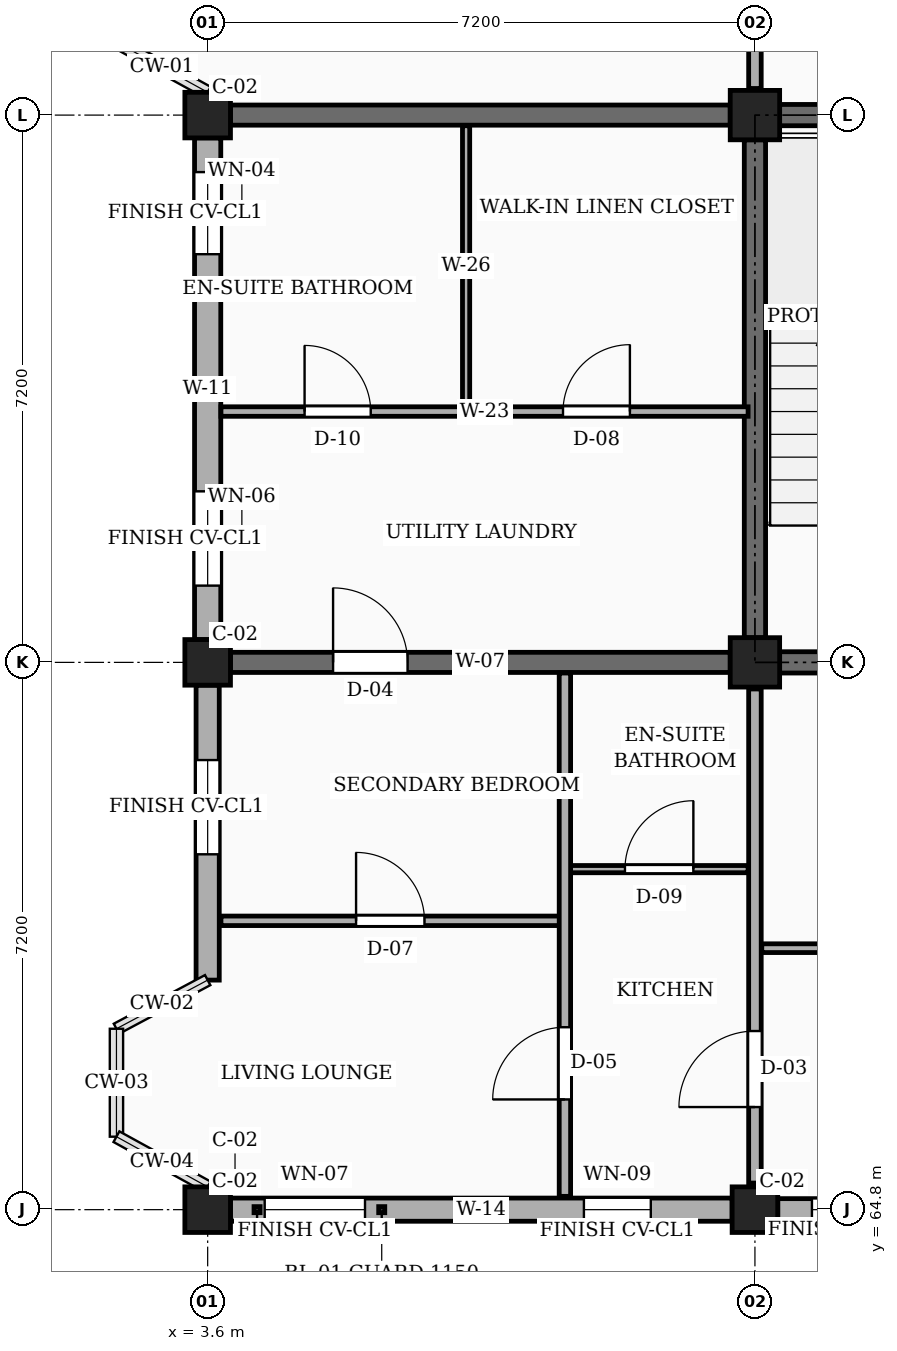
"""IFC4 building model, lengths in metres.
Left out: names, types, materials, properties, quantities, classifications, styles, units other than length and angle.
Written with IfcOpenShell. Run it as: python <this file> out.ifc"""

import sys

from ifc_helpers import new_model, si_unit, direction, frame, frame_2d, origin, origin_2d, place, context, subcontext, project, spatial, rectangle, extrude, element, fill, save


model = new_model("IFC4")
c1 = context("Model", 3, precision=1e-05, world=origin(), true_north=direction((0.0, 1.0)))
c2 = subcontext(c1, "Body", "Model", "MODEL_VIEW")
j1 = project(units=[si_unit("LENGTHUNIT", "METRE"), si_unit("PLANEANGLEUNIT", "RADIAN")], contexts=[c1])
p1 = place(None, origin())
s1 = spatial("IfcSite", under=j1, at=p1, CompositionType="ELEMENT")
p2 = place(p1, origin())
s2 = spatial("IfcBuilding", under=s1, at=p2, CompositionType="ELEMENT")
p3 = place(p2, frame((0.0, 0.0, 7.65)))
s3 = spatial("IfcBuildingStorey", under=s2, at=p3, CompositionType="ELEMENT", Elevation=7.65)
for number, where, z_axis, x_axis in (
    (1, (3.6, 64.8, 0.0), (0.0, 0.0, 1.0), (1.0, 0.0, 0.0)),
    (2, (3.6, 72.0, 0.0), (0.0, 0.0, 1.0), (1.0, 0.0, 0.0)),
    (3, (3.6, 79.2, 0.0), (0.0, 0.0, 1.0), (1.0, 0.0, 0.0)),
    (4, (10.8, 64.8, 0.0), (0.0, 0.0, 1.0), (1.0, 0.0, 0.0)),
):
    element("IfcColumn", number, at=place(p3, frame(where, z_axis=z_axis, x_axis=x_axis)), inside=s3, PredefinedType="COLUMN", context=c2, shape_type="SweptSolid", body=[
        extrude(rectangle(XDim=0.6, YDim=0.6, at=origin_2d()), origin(), (0.0, 0.0, 1.0), 3.15),
    ])
for number, where, z_axis, x_axis in (
    (5, (10.8, 72.0, 0.0), (0.0, 0.0, 1.0), (1.0, 0.0, 0.0)),
    (6, (10.8, 79.2, 0.0), (0.0, 0.0, 1.0), (1.0, 0.0, 0.0)),
):
    element("IfcColumn", number, at=place(p3, frame(where, z_axis=z_axis, x_axis=x_axis)), inside=s3, PredefinedType="COLUMN", context=c2, shape_type="SweptSolid", body=[
        extrude(rectangle(XDim=0.65, YDim=0.65, at=origin_2d()), origin(), (0.0, 0.0, 1.0), 3.15),
    ])
p4 = place(p3, frame((3.9, 72.0, 0.0), z_axis=(0.0, 0.0, 1.0), x_axis=(1.0, 0.0, 0.0)))
e7 = element("IfcWall", 7, at=p4, inside=s3, PredefinedType="SOLIDWALL", context=c2, shape_type="SweptSolid", body=[
    extrude(rectangle(XDim=6.575, YDim=0.265, at=frame_2d((3.288, 0.0))), origin(), (0.0, 0.0, 1.0), 2.21),
])
p5 = place(p4, frame((1.35, 0.0, 0.0)))
e8 = element("IfcOpeningElement", 8, at=p5, cuts=e7, PredefinedType="OPENING", context=c2, shape_type="SweptSolid", body=[
    extrude(rectangle(XDim=0.98, YDim=2.12, at=frame_2d((0.49, 1.06))), frame((0.0, 0.143, 0.0), z_axis=(0.0, -1.0, 0.0), x_axis=(1.0, 0.0, 0.0)), (0.0, 0.0, 1.0), 0.285),
])
p6 = place(p3, frame((3.9, 79.2, 0.0), z_axis=(0.0, 0.0, 1.0), x_axis=(1.0, 0.0, 0.0)))
e9 = element("IfcWall", 9, at=p6, inside=s3, PredefinedType="SOLIDWALL", context=c2, shape_type="SweptSolid", body=[
    extrude(rectangle(XDim=6.575, YDim=0.265, at=frame_2d((3.288, 0.0))), origin(), (0.0, 0.0, 1.0), 2.21),
])
p7 = place(p3, frame((3.9, 64.8, 0.0), z_axis=(0.0, 0.0, 1.0), x_axis=(1.0, 0.0, 0.0)))
e10 = element("IfcWall", 10, at=p7, inside=s3, PredefinedType="SOLIDWALL", context=c2, shape_type="SweptSolid", body=[
    extrude(rectangle(XDim=6.6, YDim=0.305, at=frame_2d((3.3, 0.0))), origin(), (0.0, 0.0, 1.0), 2.48),
])
p8 = place(p7, frame((0.45, 0.0, 0.78)))
e11 = element("IfcOpeningElement", 11, at=p8, cuts=e10, PredefinedType="OPENING", context=c2, shape_type="SweptSolid", body=[
    extrude(rectangle(XDim=1.32, YDim=1.15, at=frame_2d((0.66, 0.575))), frame((0.0, 0.163, 0.0), z_axis=(0.0, -1.0, 0.0), x_axis=(1.0, 0.0, 0.0)), (0.0, 0.0, 1.0), 0.325),
])
p9 = place(p7, frame((4.65, 0.0, 0.78)))
e12 = element("IfcOpeningElement", 12, at=p9, cuts=e10, PredefinedType="OPENING", context=c2, shape_type="SweptSolid", body=[
    extrude(rectangle(XDim=0.88, YDim=1.26, at=frame_2d((0.44, 0.63))), frame((0.0, 0.163, 0.0), z_axis=(0.0, -1.0, 0.0), x_axis=(1.0, 0.0, 0.0)), (0.0, 0.0, 1.0), 0.325),
])
p10 = place(p3, frame((11.1, 64.8, 0.0), z_axis=(0.0, 0.0, 1.0), x_axis=(1.0, 0.0, 0.0)))
e13 = element("IfcWall", 13, at=p10, inside=s3, PredefinedType="SOLIDWALL", context=c2, shape_type="SweptSolid", body=[
    extrude(rectangle(XDim=6.6, YDim=0.29, at=frame_2d((3.3, 0.0))), origin(), (0.0, 0.0, 1.0), 2.48),
])
p11 = place(p10, frame((0.45, 0.0, 0.78)))
e14 = element("IfcOpeningElement", 14, at=p11, cuts=e13, PredefinedType="OPENING", context=c2, shape_type="SweptSolid", body=[
    extrude(rectangle(XDim=0.88, YDim=1.26, at=frame_2d((0.44, 0.63))), frame((0.0, 0.155, 0.0), z_axis=(0.0, -1.0, 0.0), x_axis=(1.0, 0.0, 0.0)), (0.0, 0.0, 1.0), 0.31),
])
p12 = place(p10, frame((4.65, 0.0, 0.78)))
e15 = element("IfcOpeningElement", 15, at=p12, cuts=e13, PredefinedType="OPENING", context=c2, shape_type="SweptSolid", body=[
    extrude(rectangle(XDim=1.04, YDim=1.26, at=frame_2d((0.52, 0.63))), frame((0.0, 0.155, 0.0), z_axis=(0.0, -1.0, 0.0), x_axis=(1.0, 0.0, 0.0)), (0.0, 0.0, 1.0), 0.31),
])
p13 = place(p3, frame((3.6, 78.9, 0.0), z_axis=(0.0, 0.0, 1.0), x_axis=(0.0, -1.0, 0.0)))
e16 = element("IfcWall", 16, at=p13, inside=s3, PredefinedType="SOLIDWALL", context=c2, shape_type="SweptSolid", body=[
    extrude(rectangle(XDim=6.6, YDim=0.345, at=frame_2d((3.3, 0.0))), origin(), (0.0, 0.0, 1.0), 2.48),
])
p14 = place(p13, frame((0.45, 0.0, 0.78)))
e17 = element("IfcOpeningElement", 17, at=p14, cuts=e16, PredefinedType="OPENING", context=c2, shape_type="SweptSolid", body=[
    extrude(rectangle(XDim=1.08, YDim=1.15, at=frame_2d((0.54, 0.575))), frame((0.0, 0.183, 0.0), z_axis=(0.0, -1.0, 0.0), x_axis=(1.0, 0.0, 0.0)), (0.0, 0.0, 1.0), 0.365),
])
p15 = place(p13, frame((4.65, 0.0, 0.78)))
e18 = element("IfcOpeningElement", 18, at=p15, cuts=e16, PredefinedType="OPENING", context=c2, shape_type="SweptSolid", body=[
    extrude(rectangle(XDim=1.24, YDim=1.15, at=frame_2d((0.62, 0.575))), frame((0.0, 0.183, 0.0), z_axis=(0.0, -1.0, 0.0), x_axis=(1.0, 0.0, 0.0)), (0.0, 0.0, 1.0), 0.365),
])
p16 = place(p3, frame((3.6, 71.7, 0.0), z_axis=(0.0, 0.0, 1.0), x_axis=(0.0, -1.0, 0.0)))
e19 = element("IfcWall", 19, at=p16, inside=s3, PredefinedType="SOLIDWALL", context=c2, shape_type="SweptSolid", body=[
    extrude(rectangle(XDim=3.88, YDim=0.305, at=frame_2d((1.94, 0.0))), origin(), (0.0, 0.0, 1.0), 2.48),
])
p17 = place(p16, frame((0.985, 0.0, 0.78)))
e20 = element("IfcOpeningElement", 20, at=p17, cuts=e19, PredefinedType="OPENING", context=c2, shape_type="SweptSolid", body=[
    extrude(rectangle(XDim=1.24, YDim=1.15, at=frame_2d((0.62, 0.575))), frame((0.0, 0.163, 0.0), z_axis=(0.0, -1.0, 0.0), x_axis=(1.0, 0.0, 0.0)), (0.0, 0.0, 1.0), 0.325),
])
for number, where, z_axis, x_axis in (
    (21, (10.8, 72.325, 0.0), (0.0, 0.0, 1.0), (0.0, 1.0, 0.0)),
    (22, (11.125, 79.2, 0.0), (0.0, 0.0, 1.0), (1.0, 0.0, 0.0)),
    (23, (11.125, 72.0, 0.0), (0.0, 0.0, 1.0), (1.0, 0.0, 0.0)),
):
    element("IfcWall", number, at=place(p3, frame(where, z_axis=z_axis, x_axis=x_axis)), inside=s3, PredefinedType="SHEAR", context=c2, shape_type="SweptSolid", body=[
        extrude(rectangle(XDim=6.55, YDim=0.28, at=frame_2d((3.275, 0.0))), origin(), (0.0, 0.0, 1.0), 2.91),
    ])
p18 = place(p3, frame((10.8, 65.15, 0.0), z_axis=(0.0, 0.0, 1.0), x_axis=(0.0, 1.0, 0.0)))
e24 = element("IfcWall", 24, at=p18, inside=s3, PredefinedType="PARTITIONING", context=c2, shape_type="SweptSolid", body=[
    extrude(rectangle(XDim=6.5, YDim=0.165, at=frame_2d((3.25, 0.0))), origin(), (0.0, 0.0, 1.0), 2.26),
])
p19 = place(p18, frame((1.0, 0.0, 0.0)))
e25 = element("IfcOpeningElement", 25, at=p19, cuts=e24, PredefinedType="OPENING", context=c2, shape_type="SweptSolid", body=[
    extrude(rectangle(XDim=1.0, YDim=2.15, at=frame_2d((0.5, 1.075))), frame((0.0, 0.093, 0.0), z_axis=(0.0, -1.0, 0.0), x_axis=(1.0, 0.0, 0.0)), (0.0, 0.0, 1.0), 0.185),
])
p20 = place(p3, frame((10.8, 79.55, 0.0), z_axis=(0.0, 0.0, 1.0), x_axis=(0.0, 1.0, 0.0)))
e26 = element("IfcWall", 26, at=p20, inside=s3, PredefinedType="PARTITIONING", context=c2, shape_type="SweptSolid", body=[
    extrude(rectangle(XDim=6.5, YDim=0.165, at=frame_2d((3.25, 0.0))), origin(), (0.0, 0.0, 1.0), 2.26),
])
p21 = place(p20, frame((1.1, 0.0, 0.0)))
e27 = element("IfcOpeningElement", 27, at=p21, cuts=e26, PredefinedType="OPENING", context=c2, shape_type="SweptSolid", body=[
    extrude(rectangle(XDim=0.94, YDim=2.12, at=frame_2d((0.47, 1.06))), frame((0.0, 0.093, 0.0), z_axis=(0.0, -1.0, 0.0), x_axis=(1.0, 0.0, 0.0)), (0.0, 0.0, 1.0), 0.185),
])
p22 = place(p3, frame((10.89, 68.24, 0.0), z_axis=(0.0, 0.0, 1.0), x_axis=(1.0, 0.0, 0.0)))
e28 = element("IfcWall", 28, at=p22, inside=s3, PredefinedType="PARTITIONING", context=c2, shape_type="SweptSolid", body=[
    extrude(rectangle(XDim=7.02, YDim=0.115, at=frame_2d((3.51, 0.0))), origin(), (0.0, 0.0, 1.0), 2.345),
])
p23 = place(p22, frame((2.85, 0.0, 0.0)))
e29 = element("IfcOpeningElement", 29, at=p23, cuts=e28, PredefinedType="OPENING", context=c2, shape_type="SweptSolid", body=[
    extrude(rectangle(XDim=1.02, YDim=2.15, at=frame_2d((0.51, 1.075))), frame((0.0, 0.067, 0.0), z_axis=(0.0, -1.0, 0.0), x_axis=(1.0, 0.0, 0.0)), (0.0, 0.0, 1.0), 0.135),
])
p24 = place(p3, frame((3.775, 68.6, 0.0), z_axis=(0.0, 0.0, 1.0), x_axis=(1.0, 0.0, 0.0)))
e30 = element("IfcWall", 30, at=p24, inside=s3, PredefinedType="PARTITIONING", context=c2, shape_type="SweptSolid", body=[
    extrude(rectangle(XDim=4.455, YDim=0.125, at=frame_2d((2.228, 0.0))), origin(), (0.0, 0.0, 1.0), 2.345),
])
p25 = place(p24, frame((1.778, 0.0, 0.0)))
e31 = element("IfcOpeningElement", 31, at=p25, cuts=e30, PredefinedType="OPENING", context=c2, shape_type="SweptSolid", body=[
    extrude(rectangle(XDim=0.9, YDim=2.1, at=frame_2d((0.45, 1.05))), frame((0.0, 0.073, 0.0), z_axis=(0.0, -1.0, 0.0), x_axis=(1.0, 0.0, 0.0)), (0.0, 0.0, 1.0), 0.145),
])
p26 = place(p3, frame((8.37, 69.28, 0.0), z_axis=(0.0, 0.0, 1.0), x_axis=(1.0, 0.0, 0.0)))
e32 = element("IfcWall", 32, at=p26, inside=s3, PredefinedType="PARTITIONING", context=c2, shape_type="SweptSolid", body=[
    extrude(rectangle(XDim=2.34, YDim=0.095, at=frame_2d((1.17, 0.0))), origin(), (0.0, 0.0, 1.0), 2.345),
])
p27 = place(p26, frame((0.72, 0.0, 0.0)))
e33 = element("IfcOpeningElement", 33, at=p27, cuts=e32, PredefinedType="OPENING", context=c2, shape_type="SweptSolid", body=[
    extrude(rectangle(XDim=0.9, YDim=2.05, at=frame_2d((0.45, 1.025))), frame((0.0, 0.058, 0.0), z_axis=(0.0, -1.0, 0.0), x_axis=(1.0, 0.0, 0.0)), (0.0, 0.0, 1.0), 0.115),
])
p28 = place(p3, frame((8.3, 64.975, 0.0), z_axis=(0.0, 0.0, 1.0), x_axis=(0.0, 1.0, 0.0)))
e34 = element("IfcWall", 34, at=p28, inside=s3, PredefinedType="PARTITIONING", context=c2, shape_type="SweptSolid", body=[
    extrude(rectangle(XDim=6.885, YDim=0.15, at=frame_2d((3.442, 0.0))), origin(), (0.0, 0.0, 1.0), 2.345),
])
p29 = place(p28, frame((1.275, 0.0, 0.0)))
e35 = element("IfcOpeningElement", 35, at=p29, cuts=e34, PredefinedType="OPENING", context=c2, shape_type="SweptSolid", body=[
    extrude(rectangle(XDim=0.95, YDim=2.1, at=frame_2d((0.475, 1.05))), frame((0.0, 0.085, 0.0), z_axis=(0.0, -1.0, 0.0), x_axis=(1.0, 0.0, 0.0)), (0.0, 0.0, 1.0), 0.17),
])
p30 = place(p3, frame((3.775, 75.3, 0.0), z_axis=(0.0, 0.0, 1.0), x_axis=(1.0, 0.0, 0.0)))
e36 = element("IfcWall", 36, at=p30, inside=s3, PredefinedType="PARTITIONING", context=c2, shape_type="SweptSolid", body=[
    extrude(rectangle(XDim=6.935, YDim=0.125, at=frame_2d((3.468, 0.0))), origin(), (0.0, 0.0, 1.0), 2.345),
])
p31 = place(p30, frame((1.1, 0.0, 0.0)))
e37 = element("IfcOpeningElement", 37, at=p31, cuts=e36, PredefinedType="OPENING", context=c2, shape_type="SweptSolid", body=[
    extrude(rectangle(XDim=0.87, YDim=2.05, at=frame_2d((0.435, 1.025))), frame((0.0, 0.073, 0.0), z_axis=(0.0, -1.0, 0.0), x_axis=(1.0, 0.0, 0.0)), (0.0, 0.0, 1.0), 0.145),
])
p32 = place(p30, frame((4.5, 0.0, 0.0)))
e38 = element("IfcOpeningElement", 38, at=p32, cuts=e36, PredefinedType="OPENING", context=c2, shape_type="SweptSolid", body=[
    extrude(rectangle(XDim=0.88, YDim=2.08, at=frame_2d((0.44, 1.04))), frame((0.0, 0.073, 0.0), z_axis=(0.0, -1.0, 0.0), x_axis=(1.0, 0.0, 0.0)), (0.0, 0.0, 1.0), 0.145),
])
p33 = place(p3, frame((7.0, 75.37, 0.0), z_axis=(0.0, 0.0, 1.0), x_axis=(0.0, 1.0, 0.0)))
e39 = element("IfcWall", 39, at=p33, inside=s3, PredefinedType="PARTITIONING", context=c2, shape_type="SweptSolid", body=[
    extrude(rectangle(XDim=3.69, YDim=0.095, at=frame_2d((1.845, 0.0))), origin(), (0.0, 0.0, 1.0), 2.345),
])
p34 = place(p8, origin())
e40 = element("IfcWindow", 40, at=p34, inside=s3, PartitioningType="SINGLE_PANEL", PredefinedType="WINDOW", context=c2, shape_type="SweptSolid", body=[
    extrude(rectangle(XDim=1.32, YDim=1.15, at=frame_2d((0.66, 0.575))), frame((0.0, 0.03, 0.0), z_axis=(0.0, -1.0, 0.0), x_axis=(1.0, 0.0, 0.0)), (0.0, 0.0, 1.0), 0.06),
])
fill(e11, e40)
p35 = place(p9, origin())
e41 = element("IfcWindow", 41, at=p35, inside=s3, PartitioningType="SINGLE_PANEL", PredefinedType="WINDOW", context=c2, shape_type="SweptSolid", body=[
    extrude(rectangle(XDim=0.88, YDim=1.26, at=frame_2d((0.44, 0.63))), frame((0.0, 0.03, 0.0), z_axis=(0.0, -1.0, 0.0), x_axis=(1.0, 0.0, 0.0)), (0.0, 0.0, 1.0), 0.06),
])
fill(e12, e41)
p36 = place(p11, origin())
e42 = element("IfcWindow", 42, at=p36, inside=s3, PartitioningType="SINGLE_PANEL", PredefinedType="WINDOW", context=c2, shape_type="SweptSolid", body=[
    extrude(rectangle(XDim=0.88, YDim=1.26, at=frame_2d((0.44, 0.63))), frame((0.0, 0.03, 0.0), z_axis=(0.0, -1.0, 0.0), x_axis=(1.0, 0.0, 0.0)), (0.0, 0.0, 1.0), 0.06),
])
fill(e14, e42)
p37 = place(p14, origin())
e43 = element("IfcWindow", 43, at=p37, inside=s3, PartitioningType="SINGLE_PANEL", PredefinedType="WINDOW", context=c2, shape_type="SweptSolid", body=[
    extrude(rectangle(XDim=1.08, YDim=1.15, at=frame_2d((0.54, 0.575))), frame((0.0, 0.03, 0.0), z_axis=(0.0, -1.0, 0.0), x_axis=(1.0, 0.0, 0.0)), (0.0, 0.0, 1.0), 0.06),
])
fill(e17, e43)
p38 = place(p15, origin())
e44 = element("IfcWindow", 44, at=p38, inside=s3, PartitioningType="SINGLE_PANEL", PredefinedType="WINDOW", context=c2, shape_type="SweptSolid", body=[
    extrude(rectangle(XDim=1.24, YDim=1.15, at=frame_2d((0.62, 0.575))), frame((0.0, 0.03, 0.0), z_axis=(0.0, -1.0, 0.0), x_axis=(1.0, 0.0, 0.0)), (0.0, 0.0, 1.0), 0.06),
])
fill(e18, e44)
p39 = place(p17, origin())
e45 = element("IfcWindow", 45, at=p39, inside=s3, PartitioningType="SINGLE_PANEL", PredefinedType="WINDOW", context=c2, shape_type="SweptSolid", body=[
    extrude(rectangle(XDim=1.24, YDim=1.15, at=frame_2d((0.62, 0.575))), frame((0.0, 0.03, 0.0), z_axis=(0.0, -1.0, 0.0), x_axis=(1.0, 0.0, 0.0)), (0.0, 0.0, 1.0), 0.06),
])
fill(e20, e45)
p40 = place(p19, origin())
e46 = element("IfcDoor", 46, at=p40, inside=s3, OperationType="SINGLE_SWING_LEFT", PredefinedType="DOOR", context=c2, shape_type="SweptSolid", body=[
    extrude(rectangle(XDim=1.0, YDim=2.15, at=frame_2d((0.5, 1.075))), frame((0.0, 0.025, 0.0), z_axis=(0.0, -1.0, 0.0), x_axis=(1.0, 0.0, 0.0)), (0.0, 0.0, 1.0), 0.05),
])
fill(e25, e46)
p41 = place(p25, origin())
e47 = element("IfcDoor", 47, at=p41, inside=s3, OperationType="SINGLE_SWING_LEFT", PredefinedType="DOOR", context=c2, shape_type="SweptSolid", body=[
    extrude(rectangle(XDim=0.9, YDim=2.1, at=frame_2d((0.45, 1.05))), frame((0.0, 0.025, 0.0), z_axis=(0.0, -1.0, 0.0), x_axis=(1.0, 0.0, 0.0)), (0.0, 0.0, 1.0), 0.05),
])
fill(e31, e47)
p42 = place(p27, origin())
e48 = element("IfcDoor", 48, at=p42, inside=s3, OperationType="SINGLE_SWING_RIGHT", PredefinedType="DOOR", context=c2, shape_type="SweptSolid", body=[
    extrude(rectangle(XDim=0.9, YDim=2.05, at=frame_2d((0.45, 1.025))), frame((0.0, 0.025, 0.0), z_axis=(0.0, -1.0, 0.0), x_axis=(1.0, 0.0, 0.0)), (0.0, 0.0, 1.0), 0.05),
])
fill(e33, e48)
p43 = place(p29, origin())
e49 = element("IfcDoor", 49, at=p43, inside=s3, OperationType="SINGLE_SWING_LEFT", PredefinedType="DOOR", context=c2, shape_type="SweptSolid", body=[
    extrude(rectangle(XDim=0.95, YDim=2.1, at=frame_2d((0.475, 1.05))), frame((0.0, 0.025, 0.0), z_axis=(0.0, -1.0, 0.0), x_axis=(1.0, 0.0, 0.0)), (0.0, 0.0, 1.0), 0.05),
])
fill(e35, e49)
p44 = place(p31, origin())
e50 = element("IfcDoor", 50, at=p44, inside=s3, OperationType="SINGLE_SWING_LEFT", PredefinedType="DOOR", context=c2, shape_type="SweptSolid", body=[
    extrude(rectangle(XDim=0.87, YDim=2.05, at=frame_2d((0.435, 1.025))), frame((0.0, 0.025, 0.0), z_axis=(0.0, -1.0, 0.0), x_axis=(1.0, 0.0, 0.0)), (0.0, 0.0, 1.0), 0.05),
])
fill(e37, e50)
p45 = place(p32, origin())
e51 = element("IfcDoor", 51, at=p45, inside=s3, OperationType="SINGLE_SWING_RIGHT", PredefinedType="DOOR", context=c2, shape_type="SweptSolid", body=[
    extrude(rectangle(XDim=0.88, YDim=2.08, at=frame_2d((0.44, 1.04))), frame((0.0, 0.025, 0.0), z_axis=(0.0, -1.0, 0.0), x_axis=(1.0, 0.0, 0.0)), (0.0, 0.0, 1.0), 0.05),
])
fill(e38, e51)
p46 = place(p5, origin())
e52 = element("IfcDoor", 52, at=p46, inside=s3, OperationType="SINGLE_SWING_LEFT", PredefinedType="DOOR", context=c2, shape_type="SweptSolid", body=[
    extrude(rectangle(XDim=0.98, YDim=2.12, at=frame_2d((0.49, 1.06))), frame((0.0, 0.025, 0.0), z_axis=(0.0, -1.0, 0.0), x_axis=(1.0, 0.0, 0.0)), (0.0, 0.0, 1.0), 0.05),
])
fill(e8, e52)
save(model, sys.argv[1])
